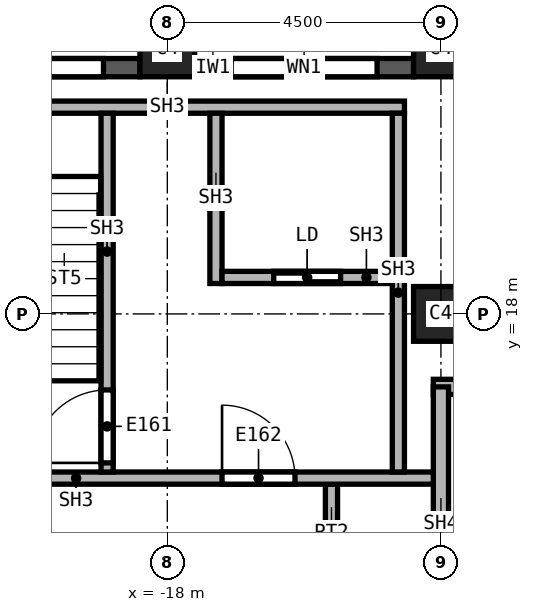
"""IFC4 building model, lengths in metres.
Left out: names, types, materials, properties, quantities, classifications, styles, units other than length and angle.
Written with IfcOpenShell. Run it as: python <this file> out.ifc"""

import sys

from ifc_helpers import new_model, si_unit, direction, frame, frame_2d, origin, origin_2d, place, context, subcontext, project, spatial, rectangle, extrude, element, fill, save


model = new_model("IFC4")
c1 = context("Model", 3, precision=1e-05, world=origin(), true_north=direction((0.0, 1.0)))
c2 = subcontext(c1, "Body", "Model", "MODEL_VIEW")
j1 = project(units=[si_unit("LENGTHUNIT", "METRE"), si_unit("PLANEANGLEUNIT", "RADIAN")], contexts=[c1])
p1 = place(None, origin())
s1 = spatial("IfcSite", under=j1, at=p1, CompositionType="ELEMENT")
p2 = place(p1, origin())
s2 = spatial("IfcBuilding", under=s1, at=p2, CompositionType="ELEMENT")
p3 = place(p2, frame((0.0, 0.0, 242.0)))
s3 = spatial("IfcBuildingStorey", under=s2, at=p3, CompositionType="ELEMENT", Elevation=242.0)
for number, where, z_axis, x_axis in (
    (1, (-13.5, 18.0, 0.0), (0.0, 0.0, 1.0), (1.0, 0.0, 0.0)),
    (2, (-13.5, 22.35, 0.0), (0.0, 0.0, 1.0), (1.0, 0.0, 0.0)),
    (3, (-18.0, 22.35, 0.0), (0.0, 0.0, 1.0), (1.0, 0.0, 0.0)),
):
    element("IfcColumn", number, at=place(p3, frame(where, z_axis=z_axis, x_axis=x_axis)), inside=s3, PredefinedType="COLUMN", context=c2, shape_type="SweptSolid", body=[
        extrude(rectangle(XDim=0.9, YDim=0.9, at=origin_2d()), origin(), (0.0, 0.0, 1.0), 3.72),
    ])
p4 = place(p3, frame((-13.95, 22.05, 0.0), z_axis=(0.0, 0.0, 1.0), x_axis=(-1.0, 0.0, 0.0)))
e4 = element("IfcWall", 4, at=p4, inside=s3, PredefinedType="SOLIDWALL", context=c2, shape_type="SweptSolid", body=[
    extrude(rectangle(XDim=3.6, YDim=0.3, at=frame_2d((1.8, 0.0))), origin(), (0.0, 0.0, 1.0), 3.12),
])
p5 = place(p4, frame((0.6, 0.0, 0.8)))
e5 = element("IfcOpeningElement", 5, at=p5, cuts=e4, PredefinedType="OPENING", context=c2, shape_type="SweptSolid", body=[
    extrude(rectangle(XDim=2.4, YDim=1.95, at=frame_2d((1.2, 0.975))), frame((0.0, 0.15, 0.0), z_axis=(0.0, -1.0, 0.0), x_axis=(1.0, 0.0, 0.0)), (0.0, 0.0, 1.0), 0.3),
])
p6 = place(p3, frame((-18.45, 22.05, 0.0), z_axis=(0.0, 0.0, 1.0), x_axis=(-1.0, 0.0, 0.0)))
e6 = element("IfcWall", 6, at=p6, inside=s3, PredefinedType="SOLIDWALL", context=c2, shape_type="SweptSolid", body=[
    extrude(rectangle(XDim=3.6, YDim=0.3, at=frame_2d((1.8, 0.0))), origin(), (0.0, 0.0, 1.0), 3.12),
])
p7 = place(p6, frame((0.6, 0.0, 0.8)))
e7 = element("IfcOpeningElement", 7, at=p7, cuts=e6, PredefinedType="OPENING", context=c2, shape_type="SweptSolid", body=[
    extrude(rectangle(XDim=2.4, YDim=1.95, at=frame_2d((1.2, 0.975))), frame((0.0, 0.15, 0.0), z_axis=(0.0, -1.0, 0.0), x_axis=(1.0, 0.0, 0.0)), (0.0, 0.0, 1.0), 0.3),
])
p8 = place(p3, frame((-15.3, 15.2, 0.0), z_axis=(0.0, 0.0, 1.0), x_axis=(0.0, -1.0, 0.0)))
e8 = element("IfcWall", 8, at=p8, inside=s3, PredefinedType="PARTITIONING", context=c2, shape_type="SweptSolid", body=[
    extrude(rectangle(XDim=1.8, YDim=0.2, at=frame_2d((0.9, 0.0))), origin(), (0.0, 0.0, 1.0), 3.72),
])
p9 = place(p3, frame((-13.625, 16.8, 0.0), z_axis=(0.0, 0.0, 1.0), x_axis=(1.0, 0.0, 0.0)))
e9 = element("IfcWall", 9, at=p9, inside=s3, PredefinedType="SOLIDWALL", context=c2, shape_type="SweptSolid", body=[
    extrude(rectangle(XDim=9.25, YDim=0.25, at=frame_2d((4.625, 0.0))), origin(), (0.0, 0.0, 1.0), 3.72),
])
p10 = place(p3, frame((-13.5, 12.3, 0.0), z_axis=(0.0, 0.0, 1.0), x_axis=(0.0, 1.0, 0.0)))
e10 = element("IfcWall", 10, at=p10, inside=s3, PredefinedType="SOLIDWALL", context=c2, shape_type="SweptSolid", body=[
    extrude(rectangle(XDim=4.5, YDim=0.25, at=frame_2d((2.25, 0.0))), origin(), (0.0, 0.0, 1.0), 3.72),
])
p11 = place(p3, frame((-21.9, 15.3, 0.0), z_axis=(0.0, 0.0, 1.0), x_axis=(1.0, 0.0, 0.0)))
e11 = element("IfcWall", 11, at=p11, inside=s3, PredefinedType="SOLIDWALL", context=c2, shape_type="SweptSolid", body=[
    extrude(rectangle(XDim=8.275, YDim=0.2, at=frame_2d((4.137, 0.0))), origin(), (0.0, 0.0, 1.0), 3.72),
])
p12 = place(p11, frame((4.8, 0.0, 0.0)))
e12 = element("IfcOpeningElement", 12, at=p12, cuts=e11, PredefinedType="OPENING", context=c2, shape_type="SweptSolid", body=[
    extrude(rectangle(XDim=1.2, YDim=2.1, at=frame_2d((0.6, 1.05))), frame((0.0, 0.1, 0.0), z_axis=(0.0, -1.0, 0.0), x_axis=(1.0, 0.0, 0.0)), (0.0, 0.0, 1.0), 0.2),
])
p13 = place(p3, frame((-21.9, 21.4, 0.0), z_axis=(0.0, 0.0, 1.0), x_axis=(1.0, 0.0, 0.0)))
e13 = element("IfcWall", 13, at=p13, inside=s3, PredefinedType="SOLIDWALL", context=c2, shape_type="SweptSolid", body=[
    extrude(rectangle(XDim=7.8, YDim=0.2, at=frame_2d((3.9, 0.0))), origin(), (0.0, 0.0, 1.0), 3.72),
])
p14 = place(p3, frame((-14.2, 15.4, 0.0), z_axis=(0.0, 0.0, 1.0), x_axis=(0.0, 1.0, 0.0)))
e14 = element("IfcWall", 14, at=p14, inside=s3, PredefinedType="SOLIDWALL", context=c2, shape_type="SweptSolid", body=[
    extrude(rectangle(XDim=5.9, YDim=0.2, at=frame_2d((2.95, 0.0))), origin(), (0.0, 0.0, 1.0), 3.72),
])
p15 = place(p3, frame((-18.99, 15.4, 0.0), z_axis=(0.0, 0.0, 1.0), x_axis=(0.0, 1.0, 0.0)))
e15 = element("IfcWall", 15, at=p15, inside=s3, PredefinedType="SOLIDWALL", context=c2, shape_type="SweptSolid", body=[
    extrude(rectangle(XDim=5.9, YDim=0.2, at=frame_2d((2.95, 0.0))), origin(), (0.0, 0.0, 1.0), 3.72),
])
p16 = place(p15, frame((0.15, 0.0, 0.0)))
e16 = element("IfcOpeningElement", 16, at=p16, cuts=e15, PredefinedType="OPENING", context=c2, shape_type="SweptSolid", body=[
    extrude(rectangle(XDim=1.2, YDim=2.1, at=frame_2d((0.6, 1.05))), frame((0.0, 0.1, 0.0), z_axis=(0.0, -1.0, 0.0), x_axis=(1.0, 0.0, 0.0)), (0.0, 0.0, 1.0), 0.2),
])
p17 = place(p3, frame((-17.2, 18.5, 0.0), z_axis=(0.0, 0.0, 1.0), x_axis=(0.0, 1.0, 0.0)))
e17 = element("IfcWall", 17, at=p17, inside=s3, PredefinedType="SOLIDWALL", context=c2, shape_type="SweptSolid", body=[
    extrude(rectangle(XDim=2.8, YDim=0.2, at=frame_2d((1.4, 0.0))), origin(), (0.0, 0.0, 1.0), 3.72),
])
p18 = place(p3, frame((-17.1, 18.6, 0.0), z_axis=(0.0, 0.0, 1.0), x_axis=(1.0, 0.0, 0.0)))
e18 = element("IfcWall", 18, at=p18, inside=s3, PredefinedType="SOLIDWALL", context=c2, shape_type="SweptSolid", body=[
    extrude(rectangle(XDim=2.8, YDim=0.2, at=frame_2d((1.4, 0.0))), origin(), (0.0, 0.0, 1.0), 3.72),
])
p19 = place(p18, frame((0.85, 0.0, 0.0)))
e19 = element("IfcOpeningElement", 19, at=p19, cuts=e18, PredefinedType="OPENING", context=c2, shape_type="SweptSolid", body=[
    extrude(rectangle(XDim=1.1, YDim=2.1, at=frame_2d((0.55, 1.05))), frame((0.0, 0.1, 0.0), z_axis=(0.0, -1.0, 0.0), x_axis=(1.0, 0.0, 0.0)), (0.0, 0.0, 1.0), 0.2),
])
p20 = place(p5, origin())
e20 = element("IfcWindow", 20, at=p20, inside=s3, PartitioningType="SINGLE_PANEL", PredefinedType="WINDOW", context=c2, shape_type="SweptSolid", body=[
    extrude(rectangle(XDim=2.4, YDim=1.95, at=frame_2d((1.2, 0.975))), frame((0.0, 0.03, 0.0), z_axis=(0.0, -1.0, 0.0), x_axis=(1.0, 0.0, 0.0)), (0.0, 0.0, 1.0), 0.06),
])
fill(e5, e20)
p21 = place(p7, origin())
e21 = element("IfcWindow", 21, at=p21, inside=s3, PartitioningType="SINGLE_PANEL", PredefinedType="WINDOW", context=c2, shape_type="SweptSolid", body=[
    extrude(rectangle(XDim=2.4, YDim=1.95, at=frame_2d((1.2, 0.975))), frame((0.0, 0.03, 0.0), z_axis=(0.0, -1.0, 0.0), x_axis=(1.0, 0.0, 0.0)), (0.0, 0.0, 1.0), 0.06),
])
fill(e7, e21)
p22 = place(p16, origin())
e22 = element("IfcDoor", 22, at=p22, inside=s3, OperationType="SINGLE_SWING_LEFT", PredefinedType="DOOR", context=c2, shape_type="SweptSolid", body=[
    extrude(rectangle(XDim=1.2, YDim=2.1, at=frame_2d((0.6, 1.05))), frame((0.0, 0.025, 0.0), z_axis=(0.0, -1.0, 0.0), x_axis=(1.0, 0.0, 0.0)), (0.0, 0.0, 1.0), 0.05),
])
fill(e16, e22)
p23 = place(p19, origin())
e23 = element("IfcDoor", 23, at=p23, inside=s3, OperationType="SLIDING_TO_LEFT", PredefinedType="DOOR", context=c2, shape_type="SweptSolid", body=[
    extrude(rectangle(XDim=1.1, YDim=2.1, at=frame_2d((0.55, 1.05))), frame((0.0, 0.025, 0.0), z_axis=(0.0, -1.0, 0.0), x_axis=(1.0, 0.0, 0.0)), (0.0, 0.0, 1.0), 0.05),
])
fill(e19, e23)
p24 = place(p12, origin())
e24 = element("IfcDoor", 24, at=p24, inside=s3, OperationType="SINGLE_SWING_RIGHT", PredefinedType="DOOR", context=c2, shape_type="SweptSolid", body=[
    extrude(rectangle(XDim=1.2, YDim=2.1, at=frame_2d((0.6, 1.05))), frame((0.0, 0.025, 0.0), z_axis=(0.0, -1.0, 0.0), x_axis=(1.0, 0.0, 0.0)), (0.0, 0.0, 1.0), 0.05),
])
fill(e12, e24)
save(model, sys.argv[1])
